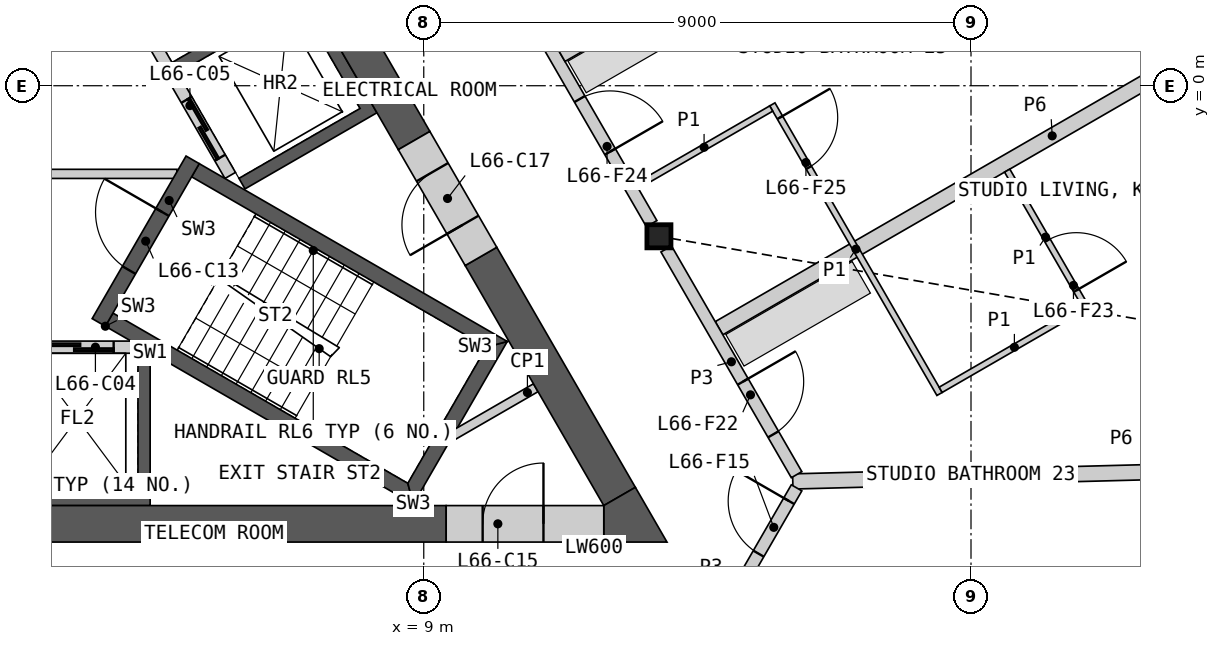
"""IFC4 building model, lengths in metres.
Left out: names, types, materials, properties, quantities, classifications, styles, units other than length and angle.
Written with IfcOpenShell. Run it as: python <this file> out.ifc"""

import sys

from ifc_helpers import new_model, si_unit, direction, frame, frame_2d, origin, origin_2d, place, context, subcontext, project, spatial, polyline, rectangle, i_section, outline, extrude, element, fill, save


model = new_model("IFC4")
c1 = context("Model", 3, precision=1e-05, world=origin(), true_north=direction((0.0, 1.0)))
c2 = subcontext(c1, "Body", "Model", "MODEL_VIEW")
j1 = project(units=[si_unit("LENGTHUNIT", "METRE"), si_unit("PLANEANGLEUNIT", "RADIAN")], contexts=[c1])
p1 = place(None, origin())
s1 = spatial("IfcSite", under=j1, at=p1, CompositionType="ELEMENT")
p2 = place(p1, origin())
s2 = spatial("IfcBuilding", under=s1, at=p2, CompositionType="ELEMENT")
p3 = place(p2, frame((0.0, 0.0, 305.2)))
s3 = spatial("IfcBuildingStorey", under=s2, at=p3, CompositionType="ELEMENT", Elevation=305.2)
p4 = place(p3, frame((12.868, -2.476, 0.0), z_axis=(0.0, 0.0, 1.0), x_axis=(1.0, 0.0, 0.0)))
e1 = element("IfcColumn", 1, at=p4, inside=s3, PredefinedType="COLUMN", context=c2, shape_type="SweptSolid", body=[
    extrude(i_section(OverallWidth=0.396, OverallDepth=0.381, WebThickness=0.019, FlangeThickness=0.03, at=origin_2d()), origin(), (0.0, 0.0, 1.0), 3.4),
])
p5 = place(p3, origin())
e2 = element("IfcWall", 2, at=p5, inside=s3, PredefinedType="SHEAR", context=c2, shape_type="SweptSolid", body=[
    extrude(outline(polyline([(4.5, -4.4), (4.5, -6.906), (-4.5, -6.906), (-4.5, -4.4), (-4.3, -4.4), (-4.3, -6.7), (-2.3, -6.7), (-2.3, -4.4), (-2.1, -4.4), (-2.1, -6.7), (-0.1, -6.7), (-0.1, -4.4), (0.1, -4.4), (0.1, -6.7), (2.1, -6.7), (2.1, -4.4), (2.3, -4.4), (2.3, -6.7), (4.3, -6.7), (4.3, -4.4), (4.5, -4.4)])), origin(), (0.0, 0.0, 1.0), 3.1),
])
p6 = place(p3, frame((-4.187, -4.3, 0.0), z_axis=(0.0, 0.0, 1.0), x_axis=(1.0, 0.0, 0.0)))
e3 = element("IfcWall", 3, at=p6, inside=s3, PredefinedType="SOLIDWALL", context=c2, shape_type="SweptSolid", body=[
    extrude(rectangle(XDim=8.373, YDim=0.2, at=frame_2d((4.187, 0.0))), origin(), (0.0, 0.0, 1.0), 3.1),
])
p7 = place(p6, frame((0.287, 0.0, 0.0)))
e4 = element("IfcOpeningElement", 4, at=p7, cuts=e3, PredefinedType="OPENING", context=c2, shape_type="SweptSolid", body=[
    extrude(rectangle(XDim=1.2, YDim=2.1, at=frame_2d((0.6, 1.05))), frame((0.0, 0.11, 0.0), z_axis=(0.0, -1.0, 0.0), x_axis=(1.0, 0.0, 0.0)), (0.0, 0.0, 1.0), 0.22),
])
p8 = place(p6, frame((2.387, 0.0, 0.0)))
e5 = element("IfcOpeningElement", 5, at=p8, cuts=e3, PredefinedType="OPENING", context=c2, shape_type="SweptSolid", body=[
    extrude(rectangle(XDim=1.4, YDim=2.1, at=frame_2d((0.7, 1.05))), frame((0.0, 0.11, 0.0), z_axis=(0.0, -1.0, 0.0), x_axis=(1.0, 0.0, 0.0)), (0.0, 0.0, 1.0), 0.22),
])
p9 = place(p6, frame((4.737, 0.0, 0.0)))
e6 = element("IfcOpeningElement", 6, at=p9, cuts=e3, PredefinedType="OPENING", context=c2, shape_type="SweptSolid", body=[
    extrude(rectangle(XDim=1.1, YDim=2.1, at=frame_2d((0.55, 1.05))), frame((0.0, 0.11, 0.0), z_axis=(0.0, -1.0, 0.0), x_axis=(1.0, 0.0, 0.0)), (0.0, 0.0, 1.0), 0.22),
])
p10 = place(p6, frame((6.887, 0.0, 0.0)))
e7 = element("IfcOpeningElement", 7, at=p10, cuts=e3, PredefinedType="OPENING", context=c2, shape_type="SweptSolid", body=[
    extrude(rectangle(XDim=1.2, YDim=2.1, at=frame_2d((0.6, 1.05))), frame((0.0, 0.11, 0.0), z_axis=(0.0, -1.0, 0.0), x_axis=(1.0, 0.0, 0.0)), (0.0, 0.0, 1.0), 0.22),
])
p11 = place(p3, origin())
e8 = element("IfcWall", 8, at=p11, inside=s3, PredefinedType="SHEAR", context=c2, shape_type="SweptSolid", body=[
    extrude(outline(polyline([(1.561, 6.097), (3.731, 7.35), (8.231, -0.444), (6.061, -1.697), (5.96, -1.524), (7.952, -0.374), (6.952, 1.358), (4.96, 0.208), (4.861, 0.381), (6.852, 1.531), (5.852, 3.263), (3.861, 2.113), (3.76, 2.287), (5.752, 3.437), (4.752, 5.169), (2.76, 4.019), (2.66, 4.192), (4.652, 5.342), (3.652, 7.074), (1.66, 5.924), (1.561, 6.097)])), origin(), (0.0, 0.0, 1.0), 3.1),
])
p12 = place(p3, frame((5.817, -1.476, 0.0), z_axis=(0.0, 0.0, 1.0), x_axis=(-0.500002616675, 0.866023893041, 0.0)))
e9 = element("IfcWall", 9, at=p12, inside=s3, PredefinedType="SOLIDWALL", context=c2, shape_type="SweptSolid", body=[
    extrude(rectangle(XDim=8.373, YDim=0.2, at=frame_2d((4.187, 0.0))), origin(), (0.0, 0.0, 1.0), 3.1),
])
p13 = place(p12, frame((0.337, 0.0, 0.0)))
e10 = element("IfcOpeningElement", 10, at=p13, cuts=e9, PredefinedType="OPENING", context=c2, shape_type="SweptSolid", body=[
    extrude(rectangle(XDim=1.1, YDim=2.1, at=frame_2d((0.55, 1.05))), frame((0.0, 0.11, 0.0), z_axis=(0.0, -1.0, 0.0), x_axis=(1.0, 0.0, 0.0)), (0.0, 0.0, 1.0), 0.22),
])
p14 = place(p12, frame((2.537, 0.0, 0.0)))
e11 = element("IfcOpeningElement", 11, at=p14, cuts=e9, PredefinedType="OPENING", context=c2, shape_type="SweptSolid", body=[
    extrude(rectangle(XDim=1.1, YDim=2.1, at=frame_2d((0.55, 1.05))), frame((0.0, 0.11, 0.0), z_axis=(0.0, -1.0, 0.0), x_axis=(1.0, 0.0, 0.0)), (0.0, 0.0, 1.0), 0.22),
])
p15 = place(p12, frame((4.737, 0.0, 0.0)))
e12 = element("IfcOpeningElement", 12, at=p15, cuts=e9, PredefinedType="OPENING", context=c2, shape_type="SweptSolid", body=[
    extrude(rectangle(XDim=1.1, YDim=2.1, at=frame_2d((0.55, 1.05))), frame((0.0, 0.11, 0.0), z_axis=(0.0, -1.0, 0.0), x_axis=(1.0, 0.0, 0.0)), (0.0, 0.0, 1.0), 0.22),
])
p16 = place(p12, frame((7.037, 0.0, 0.0)))
e13 = element("IfcOpeningElement", 13, at=p16, cuts=e9, PredefinedType="OPENING", context=c2, shape_type="SweptSolid", body=[
    extrude(rectangle(XDim=0.9, YDim=2.1, at=frame_2d((0.45, 1.05))), frame((0.0, 0.11, 0.0), z_axis=(0.0, -1.0, 0.0), x_axis=(1.0, 0.0, 0.0)), (0.0, 0.0, 1.0), 0.22),
])
p17 = place(p3, frame((-4.941, -1.45, 0.0), z_axis=(0.0, 0.0, 1.0), x_axis=(1.0, 0.0, 0.0)))
e14 = element("IfcWall", 14, at=p17, inside=s3, PredefinedType="PARTITIONING", context=c2, shape_type="SweptSolid", body=[
    extrude(rectangle(XDim=9.882, YDim=0.15, at=frame_2d((4.941, 0.0))), origin(), (0.0, 0.0, 1.0), 3.1),
])
p18 = place(p17, frame((4.391, 0.0, 0.0)))
e15 = element("IfcOpeningElement", 15, at=p18, cuts=e14, PredefinedType="OPENING", context=c2, shape_type="SweptSolid", body=[
    extrude(rectangle(XDim=1.1, YDim=2.1, at=frame_2d((0.55, 1.05))), frame((0.0, 0.085, 0.0), z_axis=(0.0, -1.0, 0.0), x_axis=(1.0, 0.0, 0.0)), (0.0, 0.0, 1.0), 0.17),
])
p19 = place(p3, origin())
e16 = element("IfcWall", 16, at=p19, inside=s3, PredefinedType="SHEAR", context=c2, shape_type="SweptSolid", body=[
    extrude(outline(polyline([(3.763, -3.956), (8.83, -6.881), (8.738, -6.539), (3.888, -3.739), (3.763, -3.956)])), origin(), (0.0, 0.0, 1.0), 3.1),
])
p20 = place(p3, origin())
e17 = element("IfcWall", 17, at=p20, inside=s3, PredefinedType="SHEAR", context=c2, shape_type="SweptSolid", body=[
    extrude(outline(polyline([(8.83, -6.881), (10.374, -4.206), (10.032, -4.298), (8.738, -6.539), (8.83, -6.881)])), origin(), (0.0, 0.0, 1.0), 3.1),
])
p21 = place(p3, origin())
e18 = element("IfcWall", 18, at=p21, inside=s3, PredefinedType="SHEAR", context=c2, shape_type="SweptSolid", body=[
    extrude(outline(polyline([(10.032, -4.298), (10.374, -4.206), (5.307, -1.281), (5.182, -1.498), (10.032, -4.298)])), origin(), (0.0, 0.0, 1.0), 3.1),
])
p22 = place(p3, frame((3.655, -3.893, 0.0), z_axis=(0.0, 0.0, 1.0), x_axis=(0.499982516597, 0.866035497597, 0.0)))
e19 = element("IfcWall", 19, at=p22, inside=s3, PredefinedType="SHEAR", context=c2, shape_type="SweptSolid", body=[
    extrude(rectangle(XDim=3.088, YDim=0.25, at=frame_2d((1.544, 0.0))), origin(), (0.0, 0.0, 1.0), 3.1),
])
p23 = place(p22, frame((0.994, 0.0, 0.0)))
e20 = element("IfcOpeningElement", 20, at=p23, cuts=e19, PredefinedType="OPENING", context=c2, shape_type="SweptSolid", body=[
    extrude(rectangle(XDim=1.1, YDim=2.1, at=frame_2d((0.55, 1.05))), frame((0.0, 0.135, 0.0), z_axis=(0.0, -1.0, 0.0), x_axis=(1.0, 0.0, 0.0)), (0.0, 0.0, 1.0), 0.27),
])
p24 = place(p3, frame((10.842, -4.967, 0.0), z_axis=(0.0, 0.0, 1.0), x_axis=(-0.866098216386, -0.499873863663, 0.0)))
e21 = element("IfcWall", 21, at=p24, inside=s3, PredefinedType="PARTITIONING", context=c2, shape_type="SweptSolid", body=[
    extrude(rectangle(XDim=1.582, YDim=0.15, at=frame_2d((0.791, 0.0))), origin(), (0.0, 0.0, 1.0), 3.1),
])
p25 = place(p3, frame((-4.892, -7.206, 0.0), z_axis=(0.0, 0.0, 1.0), x_axis=(1.0, 0.0, 0.0)))
e22 = element("IfcWall", 22, at=p25, inside=s3, PredefinedType="SHEAR", context=c2, shape_type="SweptSolid", body=[
    extrude(rectangle(XDim=14.261, YDim=0.6, at=frame_2d((7.13, 0.0))), origin(), (0.0, 0.0, 1.0), 3.1),
])
p26 = place(p3, frame((8.841, -0.902, 0.0), z_axis=(0.0, 0.0, 1.0), x_axis=(-0.499995618375, 0.866027933502, 0.0)))
e23 = element("IfcWall", 23, at=p26, inside=s3, PredefinedType="SHEAR", context=c2, shape_type="SweptSolid", body=[
    extrude(rectangle(XDim=14.571, YDim=0.6, at=frame_2d((7.285, 0.0))), origin(), (0.0, 0.0, 1.0), 3.1),
])
p27 = place(p3, frame((12.221, -6.756, 0.0), z_axis=(0.0, 0.0, 1.0), x_axis=(-0.500020646047, 0.866013483456, 0.0)))
e24 = element("IfcWall", 24, at=p27, inside=s3, PredefinedType="SHEAR", context=c2, shape_type="SweptSolid", body=[
    extrude(rectangle(XDim=4.559, YDim=0.6, at=frame_2d((2.28, 0.0))), origin(), (0.0, 0.0, 1.0), 3.1),
])
p28 = place(p3, origin())
e25 = element("IfcWall", 25, at=p28, inside=s3, PredefinedType="SHEAR", context=c2, shape_type="SweptSolid", body=[
    extrude(outline(polyline([(11.961, -7.506), (11.961, -6.906), (12.48, -6.606), (13.0, -7.506), (11.961, -7.506)])), origin(), (0.0, 0.0, 1.0), 3.1),
])
p29 = place(p3, frame((9.369, -7.206, 0.0), z_axis=(0.0, 0.0, 1.0), x_axis=(1.0, 0.0, 0.0)))
e26 = element("IfcWall", 26, at=p29, inside=s3, PredefinedType="SHEAR", context=c2, shape_type="SweptSolid", body=[
    extrude(rectangle(XDim=2.592, YDim=0.6, at=frame_2d((1.296, 0.0))), origin(), (0.0, 0.0, 1.0), 3.1),
])
p30 = place(p29, frame((0.6, 0.0, 0.0)))
e27 = element("IfcOpeningElement", 27, at=p30, cuts=e26, PredefinedType="OPENING", context=c2, shape_type="SweptSolid", body=[
    extrude(rectangle(XDim=1.0, YDim=2.1, at=frame_2d((0.5, 1.05))), frame((0.0, 0.31, 0.0), z_axis=(0.0, -1.0, 0.0), x_axis=(1.0, 0.0, 0.0)), (0.0, 0.0, 1.0), 0.62),
])
p31 = place(p3, frame((9.941, -2.807, 0.0), z_axis=(0.0, 0.0, 1.0), x_axis=(-0.499994660107, 0.866028486751, 0.0)))
e28 = element("IfcWall", 28, at=p31, inside=s3, PredefinedType="SHEAR", context=c2, shape_type="SweptSolid", body=[
    extrude(rectangle(XDim=2.2, YDim=0.6, at=frame_2d((1.1, 0.0))), origin(), (0.0, 0.0, 1.0), 3.1),
])
p32 = place(p31, frame((0.6, 0.0, 0.0)))
e29 = element("IfcOpeningElement", 29, at=p32, cuts=e28, PredefinedType="OPENING", context=c2, shape_type="SweptSolid", body=[
    extrude(rectangle(XDim=1.0, YDim=2.1, at=frame_2d((0.5, 1.05))), frame((0.0, 0.31, 0.0), z_axis=(0.0, -1.0, 0.0), x_axis=(1.0, 0.0, 0.0)), (0.0, 0.0, 1.0), 0.62),
])
p33 = place(p3, frame((15.069, -6.509, 0.0), z_axis=(0.0, 0.0, 1.0), x_axis=(0.999657828615, 0.026157708023, 0.0)))
e30 = element("IfcWall", 30, at=p33, inside=s3, PredefinedType="PARTITIONING", context=c2, shape_type="SweptSolid", body=[
    extrude(rectangle(XDim=15.773, YDim=0.25, at=frame_2d((7.887, 0.0))), origin(), (0.0, 0.0, 1.0), 2.33),
])
p34 = place(p3, frame((13.856, -3.988, 0.0), z_axis=(0.0, 0.0, 1.0), x_axis=(0.866021406514, 0.500006923412, 0.0)))
e31 = element("IfcWall", 31, at=p34, inside=s3, PredefinedType="PARTITIONING", context=c2, shape_type="SweptSolid", body=[
    extrude(rectangle(XDim=12.654, YDim=0.25, at=frame_2d((6.327, 0.0))), origin(), (0.0, 0.0, 1.0), 2.33),
])
p35 = place(p3, frame((8.698, 4.745, 0.0), z_axis=(0.0, 0.0, 1.0), x_axis=(0.499984266882, -0.866034487114, 0.0)))
e32 = element("IfcWall", 32, at=p35, inside=s3, PredefinedType="PARTITIONING", context=c2, shape_type="SweptSolid", body=[
    extrude(rectangle(XDim=8.099, YDim=0.2, at=frame_2d((4.049, 0.0))), origin(), (0.0, 0.0, 1.0), 3.1),
])
p36 = place(p35, frame((5.732, 0.0, 0.0)))
e33 = element("IfcOpeningElement", 33, at=p36, cuts=e32, PredefinedType="OPENING", context=c2, shape_type="SweptSolid", body=[
    extrude(rectangle(XDim=1.0, YDim=2.1, at=frame_2d((0.5, 1.05))), frame((0.0, 0.11, 0.0), z_axis=(0.0, -1.0, 0.0), x_axis=(1.0, 0.0, 0.0)), (0.0, 0.0, 1.0), 0.22),
])
p37 = place(p3, frame((11.26, 0.507, 0.0), z_axis=(0.0, 0.0, 1.0), x_axis=(0.86602842894, 0.499994760241, 0.0)))
e34 = element("IfcWall", 34, at=p37, inside=s3, PredefinedType="PARTITIONING", context=c2, shape_type="SweptSolid", body=[
    extrude(rectangle(XDim=7.968, YDim=0.25, at=frame_2d((3.984, 0.0))), origin(), (0.0, 0.0, 1.0), 2.33),
])
p38 = place(p3, frame((12.988, -2.684, 0.0), z_axis=(0.0, 0.0, 1.0), x_axis=(0.500003406062, -0.866023437285, 0.0)))
e35 = element("IfcWall", 35, at=p38, inside=s3, PredefinedType="PARTITIONING", context=c2, shape_type="SweptSolid", body=[
    extrude(rectangle(XDim=4.288, YDim=0.2, at=frame_2d((2.144, 0.0))), origin(), (0.0, 0.0, 1.0), 3.1),
])
p39 = place(p38, frame((2.521, 0.0, 0.0)))
e36 = element("IfcOpeningElement", 36, at=p39, cuts=e35, PredefinedType="OPENING", context=c2, shape_type="SweptSolid", body=[
    extrude(rectangle(XDim=1.0, YDim=2.1, at=frame_2d((0.5, 1.05))), frame((0.0, 0.11, 0.0), z_axis=(0.0, -1.0, 0.0), x_axis=(1.0, 0.0, 0.0)), (0.0, 0.0, 1.0), 0.22),
])
p40 = place(p3, frame((13.293, -9.797, 0.0), z_axis=(0.0, 0.0, 1.0), x_axis=(0.499967746641, 0.866044024469, 0.0)))
e37 = element("IfcWall", 37, at=p40, inside=s3, PredefinedType="PARTITIONING", context=c2, shape_type="SweptSolid", body=[
    extrude(rectangle(XDim=3.676, YDim=0.2, at=frame_2d((1.838, 0.0))), origin(), (0.0, 0.0, 1.0), 3.1),
])
p41 = place(p40, frame((2.426, 0.0, 0.0)))
e38 = element("IfcOpeningElement", 38, at=p41, cuts=e37, PredefinedType="OPENING", context=c2, shape_type="SweptSolid", body=[
    extrude(rectangle(XDim=1.0, YDim=2.1, at=frame_2d((0.5, 1.05))), frame((0.0, 0.11, 0.0), z_axis=(0.0, -1.0, 0.0), x_axis=(1.0, 0.0, 0.0)), (0.0, 0.0, 1.0), 0.22),
])
p42 = place(p3, frame((14.733, -0.307, 0.0), z_axis=(0.0, 0.0, 1.0), x_axis=(0.499996545922, -0.866027397988, 0.0)))
e39 = element("IfcWall", 39, at=p42, inside=s3, PredefinedType="PARTITIONING", context=c2, shape_type="SweptSolid", body=[
    extrude(rectangle(XDim=5.5, YDim=0.1, at=frame_2d((2.75, 0.0))), origin(), (0.0, 0.0, 1.0), 2.33),
])
p43 = place(p42, frame((0.25, 0.0, 0.0)))
e40 = element("IfcOpeningElement", 40, at=p43, cuts=e39, PredefinedType="OPENING", context=c2, shape_type="SweptSolid", body=[
    extrude(rectangle(XDim=0.95, YDim=2.1, at=frame_2d((0.475, 1.05))), frame((0.0, 0.06, 0.0), z_axis=(0.0, -1.0, 0.0), x_axis=(1.0, 0.0, 0.0)), (0.0, 0.0, 1.0), 0.12),
])
p44 = place(p3, frame((17.501, -5.001, 0.0), z_axis=(0.0, 0.0, 1.0), x_axis=(0.866034573852, 0.49998411664, 0.0)))
e41 = element("IfcWall", 41, at=p44, inside=s3, PredefinedType="PARTITIONING", context=c2, shape_type="SweptSolid", body=[
    extrude(rectangle(XDim=2.8, YDim=0.1, at=frame_2d((1.4, 0.0))), origin(), (0.0, 0.0, 1.0), 2.33),
])
p45 = place(p3, frame((18.595, -1.396, 0.0), z_axis=(0.0, 0.0, 1.0), x_axis=(0.499976333282, -0.866039067339, 0.0)))
e42 = element("IfcWall", 42, at=p45, inside=s3, PredefinedType="PARTITIONING", context=c2, shape_type="SweptSolid", body=[
    extrude(rectangle(XDim=2.525, YDim=0.1, at=frame_2d((1.262, 0.0))), origin(), (0.0, 0.0, 1.0), 2.33),
])
p46 = place(p45, frame((1.325, 0.0, 0.0)))
e43 = element("IfcOpeningElement", 43, at=p46, cuts=e42, PredefinedType="OPENING", context=c2, shape_type="SweptSolid", body=[
    extrude(rectangle(XDim=0.95, YDim=2.1, at=frame_2d((0.475, 1.05))), frame((0.0, 0.06, 0.0), z_axis=(0.0, -1.0, 0.0), x_axis=(1.0, 0.0, 0.0)), (0.0, 0.0, 1.0), 0.12),
])
p47 = place(p3, frame((12.506, -1.65, 0.0), z_axis=(0.0, 0.0, 1.0), x_axis=(0.866030925526, 0.499990435942, 0.0)))
e44 = element("IfcWall", 44, at=p47, inside=s3, PredefinedType="PARTITIONING", context=c2, shape_type="SweptSolid", body=[
    extrude(rectangle(XDim=2.55, YDim=0.1, at=frame_2d((1.275, 0.0))), origin(), (0.0, 0.0, 1.0), 2.33),
])
p48 = place(p10, origin())
e45 = element("IfcDoor", 45, at=p48, inside=s3, OperationType="SLIDING_TO_LEFT", PredefinedType="DOOR", context=c2, shape_type="SweptSolid", body=[
    extrude(rectangle(XDim=1.2, YDim=2.1, at=frame_2d((0.6, 1.05))), frame((0.0, 0.025, 0.0), z_axis=(0.0, -1.0, 0.0), x_axis=(1.0, 0.0, 0.0)), (0.0, 0.0, 1.0), 0.05),
])
fill(e7, e45)
p49 = place(p13, origin())
e46 = element("IfcDoor", 46, at=p49, inside=s3, OperationType="SLIDING_TO_LEFT", PredefinedType="DOOR", context=c2, shape_type="SweptSolid", body=[
    extrude(rectangle(XDim=1.1, YDim=2.1, at=frame_2d((0.55, 1.05))), frame((0.0, 0.025, 0.0), z_axis=(0.0, -1.0, 0.0), x_axis=(1.0, 0.0, 0.0)), (0.0, 0.0, 1.0), 0.05),
])
fill(e10, e46)
p50 = place(p23, origin())
e47 = element("IfcDoor", 47, at=p50, inside=s3, OperationType="SINGLE_SWING_RIGHT", PredefinedType="DOOR", context=c2, shape_type="SweptSolid", body=[
    extrude(rectangle(XDim=1.1, YDim=2.1, at=frame_2d((0.55, 1.05))), frame((0.0, 0.025, 0.0), z_axis=(0.0, -1.0, 0.0), x_axis=(1.0, 0.0, 0.0)), (0.0, 0.0, 1.0), 0.05),
])
fill(e20, e47)
p51 = place(p30, origin())
e48 = element("IfcDoor", 48, at=p51, inside=s3, OperationType="SINGLE_SWING_RIGHT", PredefinedType="DOOR", context=c2, shape_type="SweptSolid", body=[
    extrude(rectangle(XDim=1.0, YDim=2.1, at=frame_2d((0.5, 1.05))), frame((0.0, 0.055, 0.0), z_axis=(0.0, -1.0, 0.0), x_axis=(1.0, 0.0, 0.0)), (0.0, 0.0, 1.0), 0.05),
])
fill(e27, e48)
p52 = place(p32, origin())
e49 = element("IfcDoor", 49, at=p52, inside=s3, OperationType="SINGLE_SWING_LEFT", PredefinedType="DOOR", context=c2, shape_type="SweptSolid", body=[
    extrude(rectangle(XDim=1.0, YDim=2.1, at=frame_2d((0.5, 1.05))), frame((0.0, 0.055, 0.0), z_axis=(0.0, -1.0, 0.0), x_axis=(1.0, 0.0, 0.0)), (0.0, 0.0, 1.0), 0.05),
])
fill(e29, e49)
p53 = place(p41, origin())
e50 = element("IfcDoor", 50, at=p53, inside=s3, OperationType="SINGLE_SWING_RIGHT", PredefinedType="DOOR", context=c2, shape_type="SweptSolid", body=[
    extrude(rectangle(XDim=1.0, YDim=2.1, at=frame_2d((0.5, 1.05))), frame((0.0, 0.025, 0.0), z_axis=(0.0, -1.0, 0.0), x_axis=(1.0, 0.0, 0.0)), (0.0, 0.0, 1.0), 0.05),
])
fill(e38, e50)
p54 = place(p39, origin())
e51 = element("IfcDoor", 51, at=p54, inside=s3, OperationType="SINGLE_SWING_LEFT", PredefinedType="DOOR", context=c2, shape_type="SweptSolid", body=[
    extrude(rectangle(XDim=1.0, YDim=2.1, at=frame_2d((0.5, 1.05))), frame((0.0, 0.025, 0.0), z_axis=(0.0, -1.0, 0.0), x_axis=(1.0, 0.0, 0.0)), (0.0, 0.0, 1.0), 0.05),
])
fill(e36, e51)
p55 = place(p46, origin())
e52 = element("IfcDoor", 52, at=p55, inside=s3, OperationType="SINGLE_SWING_RIGHT", PredefinedType="DOOR", context=c2, shape_type="SweptSolid", body=[
    extrude(rectangle(XDim=0.95, YDim=2.1, at=frame_2d((0.475, 1.05))), frame((0.0, 0.025, 0.0), z_axis=(0.0, -1.0, 0.0), x_axis=(1.0, 0.0, 0.0)), (0.0, 0.0, 1.0), 0.05),
])
fill(e43, e52)
p56 = place(p36, origin())
e53 = element("IfcDoor", 53, at=p56, inside=s3, OperationType="SINGLE_SWING_RIGHT", PredefinedType="DOOR", context=c2, shape_type="SweptSolid", body=[
    extrude(rectangle(XDim=1.0, YDim=2.1, at=frame_2d((0.5, 1.05))), frame((0.0, 0.025, 0.0), z_axis=(0.0, -1.0, 0.0), x_axis=(1.0, 0.0, 0.0)), (0.0, 0.0, 1.0), 0.05),
])
fill(e33, e53)
p57 = place(p43, origin())
e54 = element("IfcDoor", 54, at=p57, inside=s3, OperationType="SINGLE_SWING_LEFT", PredefinedType="DOOR", context=c2, shape_type="SweptSolid", body=[
    extrude(rectangle(XDim=0.95, YDim=2.1, at=frame_2d((0.475, 1.05))), frame((0.0, 0.025, 0.0), z_axis=(0.0, -1.0, 0.0), x_axis=(1.0, 0.0, 0.0)), (0.0, 0.0, 1.0), 0.05),
])
fill(e40, e54)
save(model, sys.argv[1])
